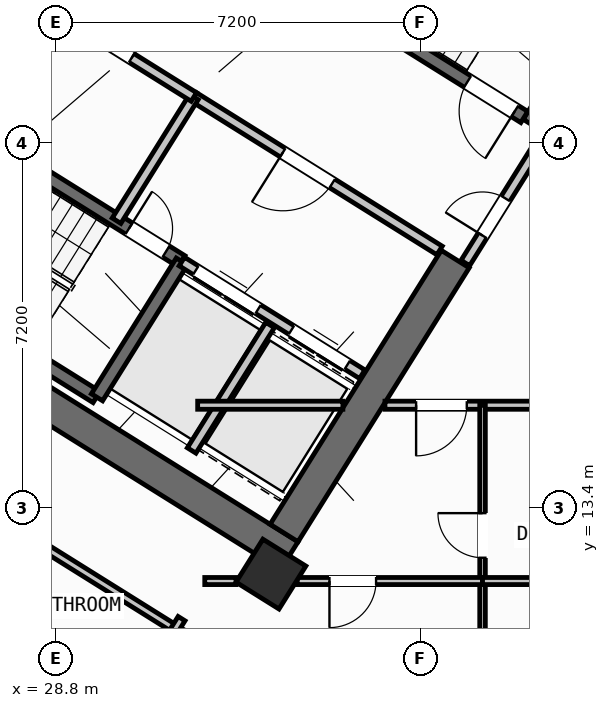
"""IFC4 building model, lengths in metres.
Left out: names, types, materials, properties, quantities, classifications, styles, units other than length and angle.
Written with IfcOpenShell. Run it as: python <this file> out.ifc"""

import sys

from ifc_helpers import new_model, si_unit, direction, frame, frame_2d, origin, origin_2d, place, context, subcontext, project, spatial, rectangle, hollow_rectangle, extrude, source, transform, mapped, element, fill, save


model = new_model("IFC4")
c1 = context("Model", 3, precision=1e-05, world=origin(), true_north=direction((0.0, 1.0)))
c2 = subcontext(c1, "Body", "Model", "MODEL_VIEW")
j1 = project(units=[si_unit("LENGTHUNIT", "METRE"), si_unit("PLANEANGLEUNIT", "RADIAN")], contexts=[c1])
p1 = place(None, origin())
s1 = spatial("IfcSite", under=j1, at=p1, CompositionType="ELEMENT")
p2 = place(p1, origin())
s2 = spatial("IfcBuilding", under=s1, at=p2, CompositionType="ELEMENT")
p3 = place(p2, frame((0.0, 0.0, 27.6)))
s3 = spatial("IfcBuildingStorey", under=s2, at=p3, CompositionType="ELEMENT", Elevation=27.6)
p4 = place(p3, frame((33.409, 12.45, 0.0), z_axis=(0.0, 0.0, 1.0), x_axis=(-0.848051132073, 0.529914405721, 0.0)))
e1 = element("IfcWall", 1, at=p4, inside=s3, PredefinedType="SHEAR", context=c2, shape_type="SweptSolid", body=[
    extrude(rectangle(XDim=13.24, YDim=0.65, at=frame_2d((6.62, 0.0))), origin(), (0.0, 0.0, 1.0), 3.35),
])
p5 = place(p3, frame((40.168, 23.88, 0.0), z_axis=(0.0, 0.0, 1.0), x_axis=(-0.529893103397, -0.8480644427, 0.0)))
e2 = element("IfcWall", 2, at=p5, inside=s3, PredefinedType="SHEAR", context=c2, shape_type="SweptSolid", body=[
    extrude(rectangle(XDim=3.525, YDim=0.65, at=frame_2d((1.763, 0.0))), origin(), (0.0, 0.0, 1.0), 3.35),
])
p6 = place(p3, frame((36.683, 18.304, 0.0), z_axis=(0.0, 0.0, 1.0), x_axis=(-0.529899109053, -0.848060690178, 0.0)))
e3 = element("IfcWall", 3, at=p6, inside=s3, PredefinedType="SHEAR", context=c2, shape_type="SweptSolid", body=[
    extrude(rectangle(XDim=6.375, YDim=0.65, at=frame_2d((3.188, 0.0))), origin(), (0.0, 0.0, 1.0), 3.35),
])
m1 = source(origin(), c2, "Body", "SweptSolid", [
    extrude(hollow_rectangle(XDim=1.0, YDim=1.0, WallThickness=0.04, at=origin_2d()), origin(), (0.0, 0.0, 1.0), 3.6),
])
p7 = place(p3, frame((33.046, 12.087, 0.0), z_axis=(0.0, 0.0, 1.0), x_axis=(-0.848048096156, 0.529919264233, 0.0)))
e4 = element("IfcColumn", 4, at=p7, inside=s3, PredefinedType="COLUMN", context=c2, shape_type="MappedRepresentation", body=[
    mapped(m1, transform((0.0, 0.0, 0.0), scale=1.0)),
])
p8 = place(p3, frame((29.268, 6.429, 0.0), z_axis=(0.0, 0.0, 1.0), x_axis=(-0.848049971435, 0.529916263149, 0.0)))
e5 = element("IfcWall", 5, at=p8, inside=s3, PredefinedType="STANDARD", context=c2, shape_type="SweptSolid", body=[
    extrude(rectangle(XDim=31.588, YDim=0.32, at=frame_2d((15.794, 0.0))), origin(), (0.0, 0.0, 1.0), 3.35),
])
p9 = place(p8, frame((16.362, 0.0, 0.0)))
e6 = element("IfcOpeningElement", 6, at=p9, cuts=e5, PredefinedType="OPENING", context=c2, shape_type="SweptSolid", body=[
    extrude(rectangle(XDim=1.2, YDim=2.15, at=frame_2d((0.6, 1.075))), frame((0.0, 0.17, 0.0), z_axis=(0.0, -1.0, 0.0), x_axis=(1.0, 0.0, 0.0)), (0.0, 0.0, 1.0), 0.34),
])
p10 = place(p8, frame((2.989, 0.0, 0.8)))
e7 = element("IfcOpeningElement", 7, at=p10, cuts=e5, PredefinedType="OPENING", context=c2, shape_type="SweptSolid", body=[
    extrude(rectangle(XDim=2.1, YDim=1.55, at=frame_2d((1.05, 0.775))), frame((0.0, 0.17, 0.0), z_axis=(0.0, -1.0, 0.0), x_axis=(1.0, 0.0, 0.0)), (0.0, 0.0, 1.0), 0.34),
])
p11 = place(p8, frame((8.359, 0.0, 0.8)))
e8 = element("IfcOpeningElement", 8, at=p11, cuts=e5, PredefinedType="OPENING", context=c2, shape_type="SweptSolid", body=[
    extrude(rectangle(XDim=2.1, YDim=1.55, at=frame_2d((1.05, 0.775))), frame((0.0, 0.17, 0.0), z_axis=(0.0, -1.0, 0.0), x_axis=(1.0, 0.0, 0.0)), (0.0, 0.0, 1.0), 0.34),
])
p12 = place(p8, frame((13.284, 0.0, 0.95)))
e9 = element("IfcOpeningElement", 9, at=p12, cuts=e5, PredefinedType="OPENING", context=c2, shape_type="SweptSolid", body=[
    extrude(rectangle(XDim=1.2, YDim=1.4, at=frame_2d((0.6, 0.7))), frame((0.0, 0.17, 0.0), z_axis=(0.0, -1.0, 0.0), x_axis=(1.0, 0.0, 0.0)), (0.0, 0.0, 1.0), 0.34),
])
p13 = place(p8, frame((29.188, 0.0, 0.95)))
e10 = element("IfcOpeningElement", 10, at=p13, cuts=e5, PredefinedType="OPENING", context=c2, shape_type="SweptSolid", body=[
    extrude(rectangle(XDim=1.2, YDim=1.4, at=frame_2d((0.6, 0.7))), frame((0.0, 0.17, 0.0), z_axis=(0.0, -1.0, 0.0), x_axis=(1.0, 0.0, 0.0)), (0.0, 0.0, 1.0), 0.34),
])
p14 = place(p8, frame((19.11, 0.0, 1.0)))
e11 = element("IfcOpeningElement", 11, at=p14, cuts=e5, PredefinedType="OPENING", context=c2, shape_type="SweptSolid", body=[
    extrude(rectangle(XDim=0.9, YDim=1.25, at=frame_2d((0.45, 0.625))), frame((0.0, 0.17, 0.0), z_axis=(0.0, -1.0, 0.0), x_axis=(1.0, 0.0, 0.0)), (0.0, 0.0, 1.0), 0.34),
])
p15 = place(p8, frame((21.226, 0.0, 1.0)))
e12 = element("IfcOpeningElement", 12, at=p15, cuts=e5, PredefinedType="OPENING", context=c2, shape_type="SweptSolid", body=[
    extrude(rectangle(XDim=0.9, YDim=1.25, at=frame_2d((0.45, 0.625))), frame((0.0, 0.17, 0.0), z_axis=(0.0, -1.0, 0.0), x_axis=(1.0, 0.0, 0.0)), (0.0, 0.0, 1.0), 0.34),
])
p16 = place(p8, frame((23.014, 0.0, 1.0)))
e13 = element("IfcOpeningElement", 13, at=p16, cuts=e5, PredefinedType="OPENING", context=c2, shape_type="SweptSolid", body=[
    extrude(rectangle(XDim=0.9, YDim=1.25, at=frame_2d((0.45, 0.625))), frame((0.0, 0.17, 0.0), z_axis=(0.0, -1.0, 0.0), x_axis=(1.0, 0.0, 0.0)), (0.0, 0.0, 1.0), 0.34),
])
p17 = place(p8, frame((24.802, 0.0, 1.0)))
e14 = element("IfcOpeningElement", 14, at=p17, cuts=e5, PredefinedType="OPENING", context=c2, shape_type="SweptSolid", body=[
    extrude(rectangle(XDim=0.9, YDim=1.25, at=frame_2d((0.45, 0.625))), frame((0.0, 0.17, 0.0), z_axis=(0.0, -1.0, 0.0), x_axis=(1.0, 0.0, 0.0)), (0.0, 0.0, 1.0), 0.34),
])
p18 = place(p8, frame((26.59, 0.0, 1.0)))
e15 = element("IfcOpeningElement", 15, at=p18, cuts=e5, PredefinedType="OPENING", context=c2, shape_type="SweptSolid", body=[
    extrude(rectangle(XDim=0.9, YDim=1.25, at=frame_2d((0.45, 0.625))), frame((0.0, 0.17, 0.0), z_axis=(0.0, -1.0, 0.0), x_axis=(1.0, 0.0, 0.0)), (0.0, 0.0, 1.0), 0.34),
])
p19 = place(p3, frame((29.605, 15.581, 0.0), z_axis=(0.0, 0.0, 1.0), x_axis=(-0.848036911448, 0.529937163087, 0.0)))
e16 = element("IfcWall", 16, at=p19, inside=s3, PredefinedType="SHEAR", context=c2, shape_type="SweptSolid", body=[
    extrude(rectangle(XDim=7.46, YDim=0.26, at=frame_2d((3.73, 0.0))), origin(), (0.0, 0.0, 1.0), 3.35),
])
p20 = place(p3, frame((31.28, 18.261, 0.0), z_axis=(0.0, 0.0, 1.0), x_axis=(-0.848051618787, 0.529913626805, 0.0)))
e17 = element("IfcWall", 17, at=p20, inside=s3, PredefinedType="SHEAR", context=c2, shape_type="SweptSolid", body=[
    extrude(rectangle(XDim=7.46, YDim=0.26, at=frame_2d((3.73, 0.0))), origin(), (0.0, 0.0, 1.0), 3.35),
])
p21 = place(p20, frame((0.36, 0.0, 0.0)))
e18 = element("IfcOpeningElement", 18, at=p21, cuts=e17, PredefinedType="OPENING", context=c2, shape_type="SweptSolid", body=[
    extrude(rectangle(XDim=0.86, YDim=2.05, at=frame_2d((0.43, 1.025))), frame((0.0, 0.14, 0.0), z_axis=(0.0, -1.0, 0.0), x_axis=(1.0, 0.0, 0.0)), (0.0, 0.0, 1.0), 0.28),
])
p22 = place(p3, frame((31.288, 18.256, 0.0), z_axis=(0.0, 0.0, 1.0), x_axis=(-0.529943379326, -0.848033026897, 0.0)))
e19 = element("IfcWall", 19, at=p22, inside=s3, PredefinedType="SHEAR", context=c2, shape_type="SweptSolid", body=[
    extrude(rectangle(XDim=3.16, YDim=0.26, at=frame_2d((1.58, 0.0))), origin(), (0.0, 0.0, 1.0), 3.35),
])
p23 = place(p3, frame((38.046, 21.108, 0.0), z_axis=(0.0, 0.0, 1.0), x_axis=(-0.848054434086, 0.529909121291, 0.0)))
e20 = element("IfcWall", 20, at=p23, inside=s3, PredefinedType="SHEAR", context=c2, shape_type="SweptSolid", body=[
    extrude(rectangle(XDim=7.33, YDim=0.26, at=frame_2d((3.665, 0.0))), origin(), (0.0, 0.0, 1.0), 3.35),
])
p24 = place(p23, frame((0.22, 0.0, 0.0)))
e21 = element("IfcOpeningElement", 21, at=p24, cuts=e20, PredefinedType="OPENING", context=c2, shape_type="SweptSolid", body=[
    extrude(rectangle(XDim=1.1, YDim=2.1, at=frame_2d((0.55, 1.05))), frame((0.0, 0.14, 0.0), z_axis=(0.0, -1.0, 0.0), x_axis=(1.0, 0.0, 0.0)), (0.0, 0.0, 1.0), 0.28),
])
p25 = place(p3, frame((34.848, 16.031, 0.0), z_axis=(0.0, 0.0, 1.0), x_axis=(-0.848044042236, 0.529925751807, 0.0)))
e22 = element("IfcWall", 22, at=p25, inside=s3, PredefinedType="STANDARD", context=c2, shape_type="SweptSolid", body=[
    extrude(rectangle(XDim=4.198, YDim=0.2, at=frame_2d((2.099, 0.0))), origin(), (0.0, 0.0, 1.0), 3.34),
])
p26 = place(p25, frame((0.348, 0.0, 0.0)))
e23 = element("IfcOpeningElement", 23, at=p26, cuts=e22, PredefinedType="OPENING", context=c2, shape_type="SweptSolid", body=[
    extrude(rectangle(XDim=1.3, YDim=2.2, at=frame_2d((0.65, 1.1))), frame((0.0, 0.11, 0.0), z_axis=(0.0, -1.0, 0.0), x_axis=(1.0, 0.0, 0.0)), (0.0, 0.0, 1.0), 0.22),
])
p27 = place(p25, frame((2.423, 0.0, 0.0)))
e24 = element("IfcOpeningElement", 24, at=p27, cuts=e22, PredefinedType="OPENING", context=c2, shape_type="SweptSolid", body=[
    extrude(rectangle(XDim=1.45, YDim=2.25, at=frame_2d((0.725, 1.125))), frame((0.0, 0.11, 0.0), z_axis=(0.0, -1.0, 0.0), x_axis=(1.0, 0.0, 0.0)), (0.0, 0.0, 1.0), 0.22),
])
p28 = place(p3, frame((36.374, 18.474, 0.0), z_axis=(0.0, 0.0, 1.0), x_axis=(-0.848051071577, 0.529914502535, 0.0)))
e25 = element("IfcWall", 25, at=p28, inside=s3, PredefinedType="STANDARD", context=c2, shape_type="SweptSolid", body=[
    extrude(rectangle(XDim=5.718, YDim=0.2, at=frame_2d((2.859, 0.0))), origin(), (0.0, 0.0, 1.0), 3.34),
])
p29 = place(p28, frame((2.498, 0.0, 0.0)))
e26 = element("IfcOpeningElement", 26, at=p29, cuts=e25, PredefinedType="OPENING", context=c2, shape_type="SweptSolid", body=[
    extrude(rectangle(XDim=1.15, YDim=2.1, at=frame_2d((0.575, 1.05))), frame((0.0, 0.11, 0.0), z_axis=(0.0, -1.0, 0.0), x_axis=(1.0, 0.0, 0.0)), (0.0, 0.0, 1.0), 0.22),
])
p30 = place(p3, frame((33.029, 17.003, 0.0), z_axis=(0.0, 0.0, 1.0), x_axis=(-0.529916267533, -0.848049968695, 0.0)))
e27 = element("IfcWall", 27, at=p30, inside=s3, PredefinedType="STANDARD", context=c2, shape_type="SweptSolid", body=[
    extrude(rectangle(XDim=2.92, YDim=0.2, at=frame_2d((1.46, 0.0))), origin(), (0.0, 0.0, 1.0), 3.34),
])
for number, where, z_axis, x_axis in (
    (28, (31.525, 21.504, 0.0), (0.0, 0.0, 1.0), (-0.53, -0.848, 0.0)),
    (29, (28.71, 23.263, 0.0), (0.0, 0.0, 1.0), (-0.53, -0.848, 0.0)),
):
    element("IfcWall", number, at=place(p3, frame(where, z_axis=z_axis, x_axis=x_axis)), inside=s3, PredefinedType="STANDARD", context=c2, shape_type="SweptSolid", body=[
        extrude(rectangle(XDim=2.88, YDim=0.2, at=frame_2d((1.44, 0.0))), origin(), (0.0, 0.0, 1.0), 3.34),
    ])
p31 = place(p3, frame((31.525, 21.504, 0.0), z_axis=(0.0, 0.0, 1.0), x_axis=(-0.848044998614, 0.529924221305, 0.0)))
e30 = element("IfcWall", 30, at=p31, inside=s3, PredefinedType="STANDARD", context=c2, shape_type="SweptSolid", body=[
    extrude(rectangle(XDim=6.168, YDim=0.2, at=frame_2d((3.084, 0.0))), origin(), (0.0, 0.0, 1.0), 3.34),
])
p32 = place(p31, frame((4.4, 0.0, 0.0)))
e31 = element("IfcOpeningElement", 31, at=p32, cuts=e30, PredefinedType="OPENING", context=c2, shape_type="SweptSolid", body=[
    extrude(rectangle(XDim=0.86, YDim=2.05, at=frame_2d((0.43, 1.025))), frame((0.0, 0.11, 0.0), z_axis=(0.0, -1.0, 0.0), x_axis=(1.0, 0.0, 0.0)), (0.0, 0.0, 1.0), 0.22),
])
p33 = place(p31, frame((1.45, 0.0, 0.0)))
e32 = element("IfcOpeningElement", 32, at=p33, cuts=e30, PredefinedType="OPENING", context=c2, shape_type="SweptSolid", body=[
    extrude(rectangle(XDim=0.86, YDim=2.05, at=frame_2d((0.43, 1.025))), frame((0.0, 0.11, 0.0), z_axis=(0.0, -1.0, 0.0), x_axis=(1.0, 0.0, 0.0)), (0.0, 0.0, 1.0), 0.22),
])
p34 = place(p3, frame((32.164, 10.374, 0.0), z_axis=(0.0, 0.0, 1.0), x_axis=(-0.848044107957, 0.529925646633, 0.0)))
e33 = element("IfcWall", 33, at=p34, inside=s3, PredefinedType="PARTITIONING", context=c2, shape_type="SweptSolid", body=[
    extrude(rectangle(XDim=15.57, YDim=0.16, at=frame_2d((7.785, 0.0))), origin(), (0.0, 0.0, 1.0), 3.34),
])
p35 = place(p34, frame((10.83, 0.0, 0.0)))
e34 = element("IfcOpeningElement", 34, at=p35, cuts=e33, PredefinedType="OPENING", context=c2, shape_type="SweptSolid", body=[
    extrude(rectangle(XDim=1.0, YDim=2.1, at=frame_2d((0.5, 1.05))), frame((0.0, 0.09, 0.0), z_axis=(0.0, -1.0, 0.0), x_axis=(1.0, 0.0, 0.0)), (0.0, 0.0, 1.0), 0.18),
])
p36 = place(p3, frame((31.282, 11.208, 0.0), z_axis=(0.0, 0.0, 1.0), x_axis=(-0.529938869374, -0.84803584519, 0.0)))
e35 = element("IfcWall", 35, at=p36, inside=s3, PredefinedType="PARTITIONING", context=c2, shape_type="SweptSolid", body=[
    extrude(rectangle(XDim=5.48, YDim=0.16, at=frame_2d((2.74, 0.0))), origin(), (0.0, 0.0, 1.0), 3.34),
])
p37 = place(p3, frame((29.72, 8.859, 0.0), z_axis=(0.0, 0.0, 1.0), x_axis=(-0.848049134363, 0.529917602752, 0.0)))
e36 = element("IfcWall", 36, at=p37, inside=s3, PredefinedType="PLUMBINGWALL", context=c2, shape_type="SweptSolid", body=[
    extrude(rectangle(XDim=14.3, YDim=0.14, at=frame_2d((7.15, 0.0))), origin(), (0.0, 0.0, 1.0), 3.34),
])
p38 = place(p37, frame((9.57, 0.0, 0.0)))
e37 = element("IfcOpeningElement", 37, at=p38, cuts=e36, PredefinedType="OPENING", context=c2, shape_type="SweptSolid", body=[
    extrude(rectangle(XDim=0.92, YDim=2.08, at=frame_2d((0.46, 1.04))), frame((0.0, 0.08, 0.0), z_axis=(0.0, -1.0, 0.0), x_axis=(1.0, 0.0, 0.0)), (0.0, 0.0, 1.0), 0.16),
])
p39 = place(p3, frame((38.451, 20.737, 0.0), z_axis=(0.0, 0.0, 1.0), x_axis=(-0.529924799939, -0.848044637038, 0.0)))
e38 = element("IfcWall", 38, at=p39, inside=s3, PredefinedType="STANDARD", context=c2, shape_type="SweptSolid", body=[
    extrude(rectangle(XDim=2.96, YDim=0.2, at=frame_2d((1.48, 0.0))), origin(), (0.0, 0.0, 1.0), 3.34),
])
p40 = place(p39, frame((1.46, 0.0, 0.0)))
e39 = element("IfcOpeningElement", 39, at=p40, cuts=e38, PredefinedType="OPENING", context=c2, shape_type="SweptSolid", body=[
    extrude(rectangle(XDim=0.86, YDim=2.05, at=frame_2d((0.43, 1.025))), frame((0.0, 0.11, 0.0), z_axis=(0.0, -1.0, 0.0), x_axis=(1.0, 0.0, 0.0)), (0.0, 0.0, 1.0), 0.22),
])
p41 = place(p3, frame((31.6, 15.42, 0.0), z_axis=(0.0, 0.0, 1.0), x_axis=(1.0, 0.0, 0.0)))
e40 = element("IfcWall", 40, at=p41, inside=s3, PredefinedType="PARTITIONING", context=c2, shape_type="SweptSolid", body=[
    extrude(rectangle(XDim=2.866, YDim=0.16, at=frame_2d((1.433, 0.0))), origin(), (0.0, 0.0, 1.0), 3.34),
])
p42 = place(p3, frame((35.296, 15.42, 0.0), z_axis=(0.0, 0.0, 1.0), x_axis=(1.0, 0.0, 0.0)))
e41 = element("IfcWall", 41, at=p42, inside=s3, PredefinedType="PARTITIONING", context=c2, shape_type="SweptSolid", body=[
    extrude(rectangle(XDim=15.311, YDim=0.16, at=frame_2d((7.655, 0.0))), origin(), (0.0, 0.0, 1.0), 3.34),
])
p43 = place(p42, frame((0.615, 0.0, 0.0)))
e42 = element("IfcOpeningElement", 42, at=p43, cuts=e41, PredefinedType="OPENING", context=c2, shape_type="SweptSolid", body=[
    extrude(rectangle(XDim=1.0, YDim=2.1, at=frame_2d((0.5, 1.05))), frame((0.0, 0.09, 0.0), z_axis=(0.0, -1.0, 0.0), x_axis=(1.0, 0.0, 0.0)), (0.0, 0.0, 1.0), 0.18),
])
p44 = place(p42, frame((9.035, 0.0, 0.0)))
e43 = element("IfcOpeningElement", 43, at=p44, cuts=e41, PredefinedType="OPENING", context=c2, shape_type="SweptSolid", body=[
    extrude(rectangle(XDim=1.0, YDim=2.1, at=frame_2d((0.5, 1.05))), frame((0.0, 0.09, 0.0), z_axis=(0.0, -1.0, 0.0), x_axis=(1.0, 0.0, 0.0)), (0.0, 0.0, 1.0), 0.18),
])
p45 = place(p3, frame((37.222, 1.96, 0.0), z_axis=(0.0, 0.0, 1.0), x_axis=(0.0, 1.0, 0.0)))
e44 = element("IfcWall", 44, at=p45, inside=s3, PredefinedType="PARTITIONING", context=c2, shape_type="SweptSolid", body=[
    extrude(rectangle(XDim=13.46, YDim=0.11, at=frame_2d((6.73, 0.0))), origin(), (0.0, 0.0, 1.0), 3.34),
])
p46 = place(p45, frame((5.2, 0.0, 0.0)))
e45 = element("IfcOpeningElement", 45, at=p46, cuts=e44, PredefinedType="OPENING", context=c2, shape_type="SweptSolid", body=[
    extrude(rectangle(XDim=0.92, YDim=2.08, at=frame_2d((0.46, 1.04))), frame((0.0, 0.065, 0.0), z_axis=(0.0, -1.0, 0.0), x_axis=(1.0, 0.0, 0.0)), (0.0, 0.0, 1.0), 0.13),
])
p47 = place(p45, frame((10.45, 0.0, 0.0)))
e46 = element("IfcOpeningElement", 46, at=p47, cuts=e44, PredefinedType="OPENING", context=c2, shape_type="SweptSolid", body=[
    extrude(rectangle(XDim=0.88, YDim=2.08, at=frame_2d((0.44, 1.04))), frame((0.0, 0.065, 0.0), z_axis=(0.0, -1.0, 0.0), x_axis=(1.0, 0.0, 0.0)), (0.0, 0.0, 1.0), 0.13),
])
p48 = place(p3, frame((31.74, 11.95, 0.0), z_axis=(0.0, 0.0, 1.0), x_axis=(1.0, 0.0, 0.0)))
e47 = element("IfcWall", 47, at=p48, inside=s3, PredefinedType="PLUMBINGWALL", context=c2, shape_type="SweptSolid", body=[
    extrude(rectangle(XDim=0.617, YDim=0.14, at=frame_2d((0.309, 0.0))), origin(), (0.0, 0.0, 1.0), 3.34),
])
p49 = place(p3, frame((33.564, 11.95, 0.0), z_axis=(0.0, 0.0, 1.0), x_axis=(1.0, 0.0, 0.0)))
e48 = element("IfcWall", 48, at=p49, inside=s3, PredefinedType="PLUMBINGWALL", context=c2, shape_type="SweptSolid", body=[
    extrude(rectangle(XDim=3.657, YDim=0.14, at=frame_2d((1.829, 0.0))), origin(), (0.0, 0.0, 1.0), 2.525),
])
p50 = place(p49, frame((0.637, 0.0, 0.0)))
e49 = element("IfcOpeningElement", 49, at=p50, cuts=e48, PredefinedType="OPENING", context=c2, shape_type="SweptSolid", body=[
    extrude(rectangle(XDim=0.92, YDim=2.08, at=frame_2d((0.46, 1.04))), frame((0.0, 0.08, 0.0), z_axis=(0.0, -1.0, 0.0), x_axis=(1.0, 0.0, 0.0)), (0.0, 0.0, 1.0), 0.16),
])
p51 = place(p3, frame((37.222, 11.95, 0.0), z_axis=(0.0, 0.0, 1.0), x_axis=(1.0, 0.0, 0.0)))
e50 = element("IfcWall", 50, at=p51, inside=s3, PredefinedType="PLUMBINGWALL", context=c2, shape_type="SweptSolid", body=[
    extrude(rectangle(XDim=4.728, YDim=0.14, at=frame_2d((2.364, 0.0))), origin(), (0.0, 0.0, 1.0), 2.525),
])
m2 = source(origin(), c2, "Body", "SweptSolid", [
    extrude(rectangle(XDim=0.86, YDim=2.05, at=frame_2d((0.43, 1.025))), frame((0.0, 0.025, 0.0), z_axis=(0.0, -1.0, 0.0), x_axis=(1.0, 0.0, 0.0)), (0.0, 0.0, 1.0), 0.05),
])
p52 = place(p21, frame((0.86, 0.0, 0.0), z_axis=(0.0, 0.0, 1.0), x_axis=(-1.0, 0.0, 0.0)))
e51 = element("IfcDoor", 51, at=p52, inside=s3, OperationType="SINGLE_SWING_LEFT", PredefinedType="DOOR", context=c2, shape_type="MappedRepresentation", body=[
    mapped(m2, transform((0.0, 0.0, 0.0), scale=1.0)),
])
fill(e18, e51)
m3 = source(origin(), c2, "Body", "SweptSolid", [
    extrude(rectangle(XDim=1.1, YDim=2.1, at=frame_2d((0.55, 1.05))), frame((0.0, 0.025, 0.0), z_axis=(0.0, -1.0, 0.0), x_axis=(1.0, 0.0, 0.0)), (0.0, 0.0, 1.0), 0.05),
])
p53 = place(p24, origin())
e52 = element("IfcDoor", 52, at=p53, inside=s3, OperationType="SINGLE_SWING_LEFT", PredefinedType="DOOR", context=c2, shape_type="MappedRepresentation", body=[
    mapped(m3, transform((0.0, 0.0, 0.0), scale=1.0)),
])
fill(e21, e52)
m4 = source(origin(), c2, "Body", "SweptSolid", [
    extrude(rectangle(XDim=1.15, YDim=2.1, at=frame_2d((0.575, 1.05))), frame((0.0, 0.025, 0.0), z_axis=(0.0, -1.0, 0.0), x_axis=(1.0, 0.0, 0.0)), (0.0, 0.0, 1.0), 0.05),
])
p54 = place(p29, origin())
e53 = element("IfcDoor", 53, at=p54, inside=s3, OperationType="SINGLE_SWING_RIGHT", PredefinedType="DOOR", context=c2, shape_type="MappedRepresentation", body=[
    mapped(m4, transform((0.0, 0.0, 0.0), scale=1.0)),
])
fill(e26, e53)
m5 = source(origin(), c2, "Body", "SweptSolid", [
    extrude(rectangle(XDim=1.3, YDim=2.2, at=frame_2d((0.65, 1.1))), frame((0.0, 0.025, 0.0), z_axis=(0.0, -1.0, 0.0), x_axis=(1.0, 0.0, 0.0)), (0.0, 0.0, 1.0), 0.05),
])
p55 = place(p26, origin())
e54 = element("IfcDoor", 54, at=p55, inside=s3, OperationType="DOUBLE_DOOR_SLIDING", PredefinedType="DOOR", context=c2, shape_type="MappedRepresentation", body=[
    mapped(m5, transform((0.0, 0.0, 0.0), scale=1.0)),
])
fill(e23, e54)
m6 = source(origin(), c2, "Body", "SweptSolid", [
    extrude(rectangle(XDim=1.45, YDim=2.25, at=frame_2d((0.725, 1.125))), frame((0.0, 0.025, 0.0), z_axis=(0.0, -1.0, 0.0), x_axis=(1.0, 0.0, 0.0)), (0.0, 0.0, 1.0), 0.05),
])
p56 = place(p27, origin())
e55 = element("IfcDoor", 55, at=p56, inside=s3, OperationType="DOUBLE_DOOR_SLIDING", PredefinedType="DOOR", context=c2, shape_type="MappedRepresentation", body=[
    mapped(m6, transform((0.0, 0.0, 0.0), scale=1.0)),
])
fill(e24, e55)
p57 = place(p33, frame((0.86, 0.0, 0.0), z_axis=(0.0, 0.0, 1.0), x_axis=(-1.0, 0.0, 0.0)))
e56 = element("IfcDoor", 56, at=p57, inside=s3, OperationType="SINGLE_SWING_RIGHT", PredefinedType="DOOR", context=c2, shape_type="MappedRepresentation", body=[
    mapped(m2, transform((0.0, 0.0, 0.0), scale=1.0)),
])
fill(e32, e56)
p58 = place(p40, frame((0.86, 0.0, 0.0), z_axis=(0.0, 0.0, 1.0), x_axis=(-1.0, 0.0, 0.0)))
e57 = element("IfcDoor", 57, at=p58, inside=s3, OperationType="SINGLE_SWING_LEFT", PredefinedType="DOOR", context=c2, shape_type="MappedRepresentation", body=[
    mapped(m2, transform((0.0, 0.0, 0.0), scale=1.0)),
])
fill(e39, e57)
m7 = source(origin(), c2, "Body", "SweptSolid", [
    extrude(rectangle(XDim=1.0, YDim=2.1, at=frame_2d((0.5, 1.05))), frame((0.0, 0.025, 0.0), z_axis=(0.0, -1.0, 0.0), x_axis=(1.0, 0.0, 0.0)), (0.0, 0.0, 1.0), 0.05),
])
p59 = place(p43, frame((1.0, 0.0, 0.0), z_axis=(0.0, 0.0, 1.0), x_axis=(-1.0, 0.0, 0.0)))
e58 = element("IfcDoor", 58, at=p59, inside=s3, OperationType="SINGLE_SWING_RIGHT", PredefinedType="DOOR", context=c2, shape_type="MappedRepresentation", body=[
    mapped(m7, transform((0.0, 0.0, 0.0), scale=1.0)),
])
fill(e42, e58)
m8 = source(origin(), c2, "Body", "SweptSolid", [
    extrude(rectangle(XDim=0.92, YDim=2.08, at=frame_2d((0.46, 1.04))), frame((0.0, 0.025, 0.0), z_axis=(0.0, -1.0, 0.0), x_axis=(1.0, 0.0, 0.0)), (0.0, 0.0, 1.0), 0.05),
])
p60 = place(p50, frame((0.92, 0.0, 0.0), z_axis=(0.0, 0.0, 1.0), x_axis=(-1.0, 0.0, 0.0)))
e59 = element("IfcDoor", 59, at=p60, inside=s3, OperationType="SINGLE_SWING_RIGHT", PredefinedType="DOOR", context=c2, shape_type="MappedRepresentation", body=[
    mapped(m8, transform((0.0, 0.0, 0.0), scale=1.0)),
])
fill(e49, e59)
m9 = source(origin(), c2, "Body", "SweptSolid", [
    extrude(rectangle(XDim=0.88, YDim=2.08, at=frame_2d((0.44, 1.04))), frame((0.0, 0.025, 0.0), z_axis=(0.0, -1.0, 0.0), x_axis=(1.0, 0.0, 0.0)), (0.0, 0.0, 1.0), 0.05),
])
p61 = place(p47, origin())
e60 = element("IfcDoor", 60, at=p61, inside=s3, OperationType="SINGLE_SWING_RIGHT", PredefinedType="DOOR", context=c2, shape_type="MappedRepresentation", body=[
    mapped(m9, transform((0.0, 0.0, 0.0), scale=1.0)),
])
fill(e46, e60)
save(model, sys.argv[1])
